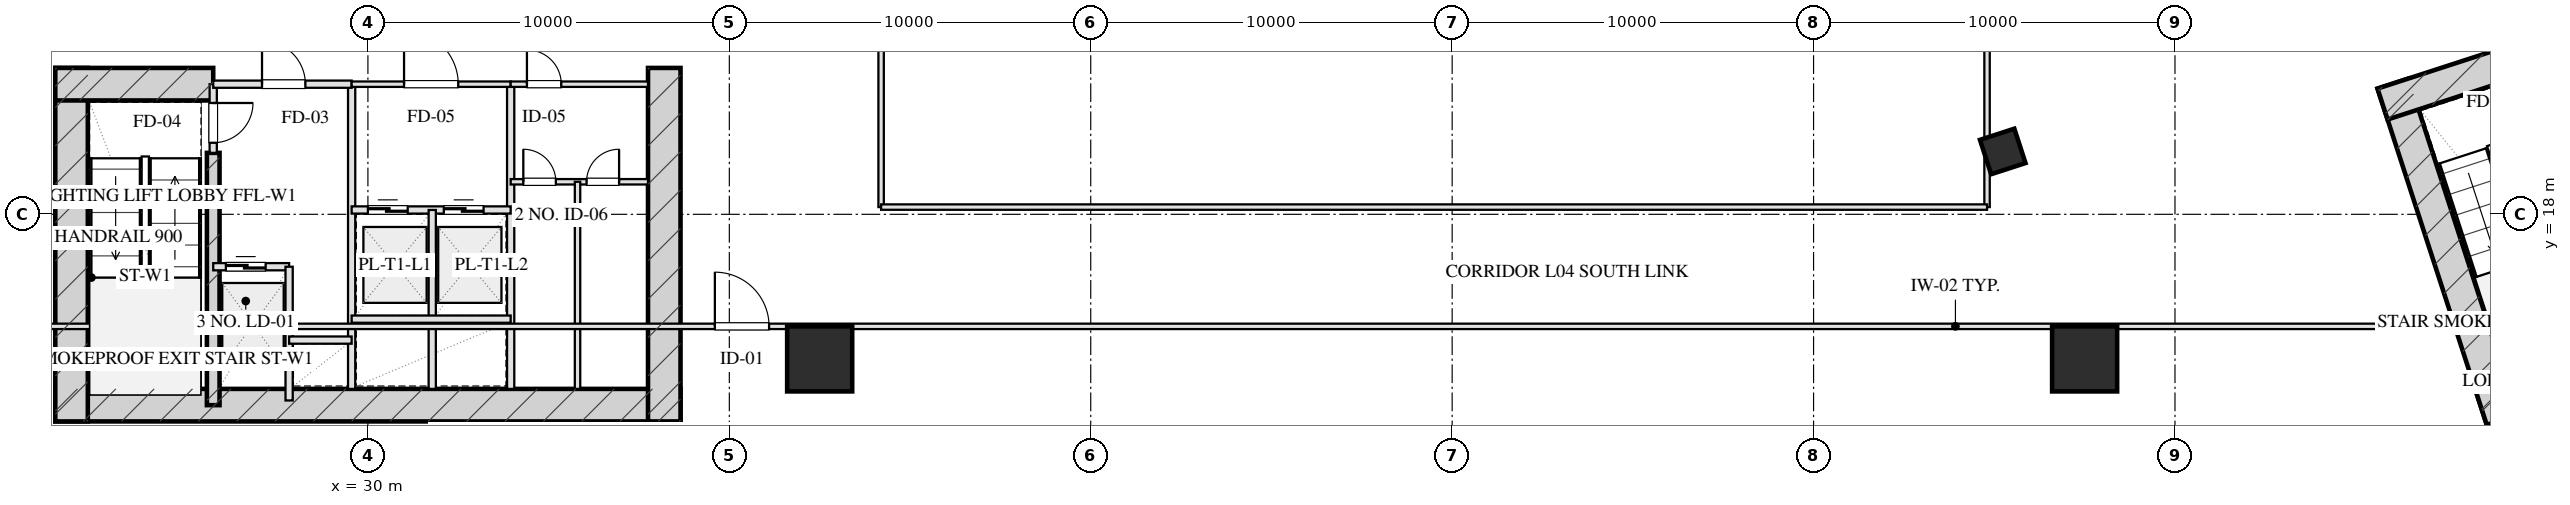
"""IFC4 building model, lengths in metres.
Left out: names, types, materials, properties, quantities, classifications, styles, units other than length and angle.
Written with IfcOpenShell. Run it as: python <this file> out.ifc"""

import sys

from ifc_helpers import new_model, si_unit, direction, frame, frame_2d, origin, origin_2d, place, context, subcontext, project, spatial, rectangle, hollow_rectangle, extrude, element, fill, save


model = new_model("IFC4")
c1 = context("Model", 3, precision=1e-05, world=origin(), true_north=direction((0.0, 1.0)))
c2 = subcontext(c1, "Body", "Model", "MODEL_VIEW")
j1 = project(units=[si_unit("LENGTHUNIT", "METRE"), si_unit("PLANEANGLEUNIT", "RADIAN")], contexts=[c1])
p1 = place(None, origin())
s1 = spatial("IfcSite", under=j1, at=p1, CompositionType="ELEMENT")
p2 = place(p1, origin())
s2 = spatial("IfcBuilding", under=s1, at=p2, CompositionType="ELEMENT")
p3 = place(p2, frame((0.0, 0.0, 22.0)))
s3 = spatial("IfcBuildingStorey", under=s2, at=p3, CompositionType="ELEMENT", Elevation=22.0)
p4 = place(p3, frame((21.35, 12.72, 0.0), z_axis=(0.0, 0.0, 1.0), x_axis=(1.0, 0.0, 0.0)))
e1 = element("IfcWall", 1, at=p4, inside=s3, PredefinedType="SHEAR", context=c2, shape_type="SweptSolid", body=[
    extrude(rectangle(XDim=17.3, YDim=0.9, at=frame_2d((8.65, 0.0))), origin(), (0.0, 0.0, 1.0), 4.0),
])
for number, where, z_axis, x_axis in (
    (2, (21.8, 22.05, 0.0), (0.0, 0.0, 1.0), (0.0, -1.0, 0.0)),
    (3, (38.2, 22.05, 0.0), (0.0, 0.0, 1.0), (0.0, -1.0, 0.0)),
):
    element("IfcWall", number, at=place(p3, frame(where, z_axis=z_axis, x_axis=x_axis)), inside=s3, PredefinedType="SHEAR", context=c2, shape_type="SweptSolid", body=[
        extrude(rectangle(XDim=9.78, YDim=0.9, at=frame_2d((4.89, 0.0))), origin(), (0.0, 0.0, 1.0), 4.0),
    ])
p5 = place(p3, frame((25.72, 19.7, 0.0), z_axis=(0.0, 0.0, 1.0), x_axis=(0.0, -1.0, 0.0)))
e4 = element("IfcWall", 4, at=p5, inside=s3, PredefinedType="SHEAR", context=c2, shape_type="SweptSolid", body=[
    extrude(rectangle(XDim=6.98, YDim=0.35, at=frame_2d((3.49, 0.0))), origin(), (0.0, 0.0, 1.0), 4.0),
])
p6 = place(p3, frame((21.35, 21.6, 0.0), z_axis=(0.0, 0.0, 1.0), x_axis=(1.0, 0.0, 0.0)))
e5 = element("IfcWall", 5, at=p6, inside=s3, PredefinedType="SHEAR", context=c2, shape_type="SweptSolid", body=[
    extrude(rectangle(XDim=4.37, YDim=0.9, at=frame_2d((2.185, 0.0))), origin(), (0.0, 0.0, 1.0), 4.0),
])
p7 = place(p3, frame((88.487, 12.605, 0.0), z_axis=(0.0, 0.0, 1.0), x_axis=(0.951055016115, 0.309021611416, 0.0)))
e6 = element("IfcWall", 6, at=p7, inside=s3, PredefinedType="SHEAR", context=c2, shape_type="SweptSolid", body=[
    extrude(rectangle(XDim=16.7, YDim=0.9, at=frame_2d((8.35, 0.0))), origin(), (0.0, 0.0, 1.0), 4.0),
])
p8 = place(p3, frame((86.032, 21.618, 0.0), z_axis=(0.0, 0.0, 1.0), x_axis=(0.30901438634, -0.951057363693, 0.0)))
e7 = element("IfcWall", 7, at=p8, inside=s3, PredefinedType="SHEAR", context=c2, shape_type="SweptSolid", body=[
    extrude(rectangle(XDim=9.78, YDim=0.9, at=frame_2d((4.89, 0.0))), origin(), (0.0, 0.0, 1.0), 4.0),
])
p9 = place(p3, frame((85.743, 21.051, 0.0), z_axis=(0.0, 0.0, 1.0), x_axis=(0.951063623806, 0.308995118848, 0.0)))
e8 = element("IfcWall", 8, at=p9, inside=s3, PredefinedType="SHEAR", context=c2, shape_type="SweptSolid", body=[
    extrude(rectangle(XDim=4.37, YDim=0.9, at=frame_2d((2.185, 0.0))), origin(), (0.0, 0.0, 1.0), 4.0),
])
for number, where, z_axis, x_axis in (
    (9, (42.5, 14.0, 0.0), (0.0, 0.0, 1.0), (1.0, 0.0, 0.0)),
    (10, (77.5, 14.0, 0.0), (0.0, 0.0, 1.0), (1.0, 0.0, 0.0)),
):
    element("IfcColumn", number, at=place(p3, frame(where, z_axis=z_axis, x_axis=x_axis)), inside=s3, PredefinedType="COLUMN", context=c2, shape_type="SweptSolid", body=[
        extrude(hollow_rectangle(XDim=1.8, YDim=1.8, WallThickness=0.06, at=origin_2d()), origin(), (0.0, 0.0, 1.0), 4.001),
    ])
p10 = place(p3, frame((75.234, 19.739, 0.0), z_axis=(0.0, 0.0, 1.0), x_axis=(0.951056516295, 0.309016994375, 0.0)))
e11 = element("IfcColumn", 11, at=p10, inside=s3, PredefinedType="COLUMN", context=c2, shape_type="SweptSolid", body=[
    extrude(hollow_rectangle(XDim=1.0, YDim=1.0, WallThickness=0.036, at=origin_2d()), origin(), (0.0, 0.0, 1.0), 4.001),
])
p11 = place(p3, frame((25.72, 21.6, 0.0), z_axis=(0.0, 0.0, 1.0), x_axis=(0.0, -1.0, 0.0)))
e12 = element("IfcWall", 12, at=p11, inside=s3, PredefinedType="PARTITIONING", context=c2, shape_type="SweptSolid", body=[
    extrude(rectangle(XDim=1.9, YDim=0.2, at=frame_2d((0.95, 0.0))), origin(), (0.0, 0.0, 1.0), 3.725),
])
p12 = place(p11, frame((0.52, 0.0, 0.0)))
e13 = element("IfcOpeningElement", 13, at=p12, cuts=e12, PredefinedType="OPENING", context=c2, shape_type="SweptSolid", body=[
    extrude(rectangle(XDim=1.1, YDim=2.05, at=frame_2d((0.55, 1.025))), frame((0.0, 0.11, 0.0), z_axis=(0.0, -1.0, 0.0), x_axis=(1.0, 0.0, 0.0)), (0.0, 0.0, 1.0), 0.22),
])
p13 = place(p3, frame((29.55, 21.6, 0.0), z_axis=(0.0, 0.0, 1.0), x_axis=(0.0, -1.0, 0.0)))
e14 = element("IfcWall", 14, at=p13, inside=s3, PredefinedType="PARTITIONING", context=c2, shape_type="SweptSolid", body=[
    extrude(rectangle(XDim=8.43, YDim=0.2, at=frame_2d((4.215, 0.0))), origin(), (0.0, 0.0, 1.0), 3.725),
])
p14 = place(p3, frame((25.72, 21.6, 0.0), z_axis=(0.0, 0.0, 1.0), x_axis=(1.0, 0.0, 0.0)))
e15 = element("IfcWall", 15, at=p14, inside=s3, PredefinedType="PARTITIONING", context=c2, shape_type="SweptSolid", body=[
    extrude(rectangle(XDim=3.83, YDim=0.2, at=frame_2d((1.915, 0.0))), origin(), (0.0, 0.0, 1.0), 3.725),
])
p15 = place(p14, frame((1.35, 0.0, 0.0)))
e16 = element("IfcOpeningElement", 16, at=p15, cuts=e15, PredefinedType="OPENING", context=c2, shape_type="SweptSolid", body=[
    extrude(rectangle(XDim=1.2, YDim=2.05, at=frame_2d((0.6, 1.025))), frame((0.0, 0.11, 0.0), z_axis=(0.0, -1.0, 0.0), x_axis=(1.0, 0.0, 0.0)), (0.0, 0.0, 1.0), 0.22),
])
p16 = place(p3, frame((25.72, 16.55, 0.0), z_axis=(0.0, 0.0, 1.0), x_axis=(1.0, 0.0, 0.0)))
e17 = element("IfcWall", 17, at=p16, inside=s3, PredefinedType="PARTITIONING", context=c2, shape_type="SweptSolid", body=[
    extrude(rectangle(XDim=2.1, YDim=0.2, at=frame_2d((1.05, 0.0))), origin(), (0.0, 0.0, 1.0), 3.725),
])
p17 = place(p16, frame((0.35, 0.0, 0.0)))
e18 = element("IfcOpeningElement", 18, at=p17, cuts=e17, PredefinedType="OPENING", context=c2, shape_type="SweptSolid", body=[
    extrude(rectangle(XDim=1.1, YDim=2.05, at=frame_2d((0.55, 1.025))), frame((0.0, 0.11, 0.0), z_axis=(0.0, -1.0, 0.0), x_axis=(1.0, 0.0, 0.0)), (0.0, 0.0, 1.0), 0.22),
])
p18 = place(p3, frame((27.82, 16.55, 0.0), z_axis=(0.0, 0.0, 1.0), x_axis=(0.0, -1.0, 0.0)))
e19 = element("IfcWall", 19, at=p18, inside=s3, PredefinedType="PARTITIONING", context=c2, shape_type="SweptSolid", body=[
    extrude(rectangle(XDim=3.7, YDim=0.2, at=frame_2d((1.85, 0.0))), origin(), (0.0, 0.0, 1.0), 3.725),
])
p19 = place(p3, frame((27.82, 14.52, 0.0), z_axis=(0.0, 0.0, 1.0), x_axis=(1.0, 0.0, 0.0)))
e20 = element("IfcWall", 20, at=p19, inside=s3, PredefinedType="PARTITIONING", context=c2, shape_type="SweptSolid", body=[
    extrude(rectangle(XDim=1.73, YDim=0.2, at=frame_2d((0.865, 0.0))), origin(), (0.0, 0.0, 1.0), 3.725),
])
p20 = place(p3, frame((33.95, 21.6, 0.0), z_axis=(0.0, 0.0, 1.0), x_axis=(0.0, -1.0, 0.0)))
e21 = element("IfcWall", 21, at=p20, inside=s3, PredefinedType="PARTITIONING", context=c2, shape_type="SweptSolid", body=[
    extrude(rectangle(XDim=8.43, YDim=0.2, at=frame_2d((4.215, 0.0))), origin(), (0.0, 0.0, 1.0), 3.725),
])
p21 = place(p3, frame((29.55, 21.6, 0.0), z_axis=(0.0, 0.0, 1.0), x_axis=(1.0, 0.0, 0.0)))
e22 = element("IfcWall", 22, at=p21, inside=s3, PredefinedType="PARTITIONING", context=c2, shape_type="SweptSolid", body=[
    extrude(rectangle(XDim=4.4, YDim=0.15, at=frame_2d((2.2, 0.0))), origin(), (0.0, 0.0, 1.0), 3.725),
])
p22 = place(p21, frame((1.45, 0.0, 0.0)))
e23 = element("IfcOpeningElement", 23, at=p22, cuts=e22, PredefinedType="OPENING", context=c2, shape_type="SweptSolid", body=[
    extrude(rectangle(XDim=1.5, YDim=2.05, at=frame_2d((0.75, 1.025))), frame((0.0, 0.085, 0.0), z_axis=(0.0, -1.0, 0.0), x_axis=(1.0, 0.0, 0.0)), (0.0, 0.0, 1.0), 0.17),
])
p23 = place(p3, frame((29.55, 18.12, 0.0), z_axis=(0.0, 0.0, 1.0), x_axis=(1.0, 0.0, 0.0)))
e24 = element("IfcWall", 24, at=p23, inside=s3, PredefinedType="PARTITIONING", context=c2, shape_type="SweptSolid", body=[
    extrude(rectangle(XDim=4.4, YDim=0.2, at=frame_2d((2.2, 0.0))), origin(), (0.0, 0.0, 1.0), 3.725),
])
p24 = place(p23, frame((0.45, 0.0, 0.0)))
e25 = element("IfcOpeningElement", 25, at=p24, cuts=e24, PredefinedType="OPENING", context=c2, shape_type="SweptSolid", body=[
    extrude(rectangle(XDim=1.1, YDim=2.05, at=frame_2d((0.55, 1.025))), frame((0.0, 0.11, 0.0), z_axis=(0.0, -1.0, 0.0), x_axis=(1.0, 0.0, 0.0)), (0.0, 0.0, 1.0), 0.22),
])
p25 = place(p23, frame((2.55, 0.0, 0.0)))
e26 = element("IfcOpeningElement", 26, at=p25, cuts=e24, PredefinedType="OPENING", context=c2, shape_type="SweptSolid", body=[
    extrude(rectangle(XDim=1.1, YDim=2.05, at=frame_2d((0.55, 1.025))), frame((0.0, 0.11, 0.0), z_axis=(0.0, -1.0, 0.0), x_axis=(1.0, 0.0, 0.0)), (0.0, 0.0, 1.0), 0.22),
])
p26 = place(p3, frame((31.78, 18.12, 0.0), z_axis=(0.0, 0.0, 1.0), x_axis=(0.0, -1.0, 0.0)))
e27 = element("IfcWall", 27, at=p26, inside=s3, PredefinedType="PARTITIONING", context=c2, shape_type="SweptSolid", body=[
    extrude(rectangle(XDim=4.95, YDim=0.2, at=frame_2d((2.475, 0.0))), origin(), (0.0, 0.0, 1.0), 3.725),
])
p27 = place(p3, frame((29.55, 15.1, 0.0), z_axis=(0.0, 0.0, 1.0), x_axis=(1.0, 0.0, 0.0)))
e28 = element("IfcWall", 28, at=p27, inside=s3, PredefinedType="PARTITIONING", context=c2, shape_type="SweptSolid", body=[
    extrude(rectangle(XDim=4.4, YDim=0.2, at=frame_2d((2.2, 0.0))), origin(), (0.0, 0.0, 1.0), 3.725),
])
p28 = place(p3, frame((33.95, 21.6, 0.0), z_axis=(0.0, 0.0, 1.0), x_axis=(1.0, 0.0, 0.0)))
e29 = element("IfcWall", 29, at=p28, inside=s3, PredefinedType="PARTITIONING", context=c2, shape_type="SweptSolid", body=[
    extrude(rectangle(XDim=3.8, YDim=0.15, at=frame_2d((1.9, 0.0))), origin(), (0.0, 0.0, 1.0), 3.725),
])
p29 = place(p28, frame((0.45, 0.0, 0.0)))
e30 = element("IfcOpeningElement", 30, at=p29, cuts=e29, PredefinedType="OPENING", context=c2, shape_type="SweptSolid", body=[
    extrude(rectangle(XDim=0.95, YDim=2.05, at=frame_2d((0.475, 1.025))), frame((0.0, 0.085, 0.0), z_axis=(0.0, -1.0, 0.0), x_axis=(1.0, 0.0, 0.0)), (0.0, 0.0, 1.0), 0.17),
])
p30 = place(p3, frame((33.95, 18.9, 0.0), z_axis=(0.0, 0.0, 1.0), x_axis=(1.0, 0.0, 0.0)))
e31 = element("IfcWall", 31, at=p30, inside=s3, PredefinedType="PARTITIONING", context=c2, shape_type="SweptSolid", body=[
    extrude(rectangle(XDim=3.8, YDim=0.15, at=frame_2d((1.9, 0.0))), origin(), (0.0, 0.0, 1.0), 3.725),
])
p31 = place(p30, frame((0.35, 0.0, 0.0)))
e32 = element("IfcOpeningElement", 32, at=p31, cuts=e31, PredefinedType="OPENING", context=c2, shape_type="SweptSolid", body=[
    extrude(rectangle(XDim=0.9, YDim=2.05, at=frame_2d((0.45, 1.025))), frame((0.0, 0.085, 0.0), z_axis=(0.0, -1.0, 0.0), x_axis=(1.0, 0.0, 0.0)), (0.0, 0.0, 1.0), 0.17),
])
p32 = place(p30, frame((2.1, 0.0, 0.0)))
e33 = element("IfcOpeningElement", 33, at=p32, cuts=e31, PredefinedType="OPENING", context=c2, shape_type="SweptSolid", body=[
    extrude(rectangle(XDim=0.9, YDim=2.05, at=frame_2d((0.45, 1.025))), frame((0.0, 0.085, 0.0), z_axis=(0.0, -1.0, 0.0), x_axis=(1.0, 0.0, 0.0)), (0.0, 0.0, 1.0), 0.17),
])
p33 = place(p3, frame((35.8, 18.9, 0.0), z_axis=(0.0, 0.0, 1.0), x_axis=(0.0, -1.0, 0.0)))
e34 = element("IfcWall", 34, at=p33, inside=s3, PredefinedType="PARTITIONING", context=c2, shape_type="SweptSolid", body=[
    extrude(rectangle(XDim=5.73, YDim=0.15, at=frame_2d((2.865, 0.0))), origin(), (0.0, 0.0, 1.0), 3.725),
])
p34 = place(p3, frame((44.2, 18.2, 0.0), z_axis=(0.0, 0.0, 1.0), x_axis=(0.0, 1.0, 0.0)))
e35 = element("IfcWall", 35, at=p34, inside=s3, PredefinedType="PARTITIONING", context=c2, shape_type="SweptSolid", body=[
    extrude(rectangle(XDim=31.6, YDim=0.15, at=frame_2d((15.8, 0.0))), origin(), (0.0, 0.0, 1.0), 3.725),
])
p35 = place(p34, frame((14.0, 0.0, 0.0)))
e36 = element("IfcOpeningElement", 36, at=p35, cuts=e35, PredefinedType="OPENING", context=c2, shape_type="SweptSolid", body=[
    extrude(rectangle(XDim=1.5, YDim=2.05, at=frame_2d((0.75, 1.025))), frame((0.0, 0.085, 0.0), z_axis=(0.0, -1.0, 0.0), x_axis=(1.0, 0.0, 0.0)), (0.0, 0.0, 1.0), 0.17),
])
p36 = place(p3, frame((74.8, 18.2, 0.0), z_axis=(0.0, 0.0, 1.0), x_axis=(0.0, 1.0, 0.0)))
e37 = element("IfcWall", 37, at=p36, inside=s3, PredefinedType="PARTITIONING", context=c2, shape_type="SweptSolid", body=[
    extrude(rectangle(XDim=31.6, YDim=0.15, at=frame_2d((15.8, 0.0))), origin(), (0.0, 0.0, 1.0), 2.315),
])
p37 = place(p36, frame((14.0, 0.0, 0.0)))
e38 = element("IfcOpeningElement", 38, at=p37, cuts=e37, PredefinedType="OPENING", context=c2, shape_type="SweptSolid", body=[
    extrude(rectangle(XDim=1.5, YDim=2.05, at=frame_2d((0.75, 1.025))), frame((0.0, 0.085, 0.0), z_axis=(0.0, -1.0, 0.0), x_axis=(1.0, 0.0, 0.0)), (0.0, 0.0, 1.0), 0.17),
])
p38 = place(p3, frame((44.2, 18.2, 0.0), z_axis=(0.0, 0.0, 1.0), x_axis=(1.0, 0.0, 0.0)))
e39 = element("IfcWall", 39, at=p38, inside=s3, PredefinedType="PARTITIONING", context=c2, shape_type="SweptSolid", body=[
    extrude(rectangle(XDim=30.6, YDim=0.15, at=frame_2d((15.3, 0.0))), origin(), (0.0, 0.0, 1.0), 3.265),
])
p39 = place(p3, frame((18.0, 14.9, 0.0), z_axis=(0.0, 0.0, 1.0), x_axis=(1.0, 0.0, 0.0)))
e40 = element("IfcWall", 40, at=p39, inside=s3, PredefinedType="PARTITIONING", context=c2, shape_type="SweptSolid", body=[
    extrude(rectangle(XDim=88.0, YDim=0.15, at=frame_2d((44.0, 0.0))), origin(), (0.0, 0.0, 1.0), 2.615),
])
p40 = place(p39, frame((21.6, 0.0, 0.0)))
e41 = element("IfcOpeningElement", 41, at=p40, cuts=e40, PredefinedType="OPENING", context=c2, shape_type="SweptSolid", body=[
    extrude(rectangle(XDim=1.5, YDim=2.05, at=frame_2d((0.75, 1.025))), frame((0.0, 0.085, 0.0), z_axis=(0.0, -1.0, 0.0), x_axis=(1.0, 0.0, 0.0)), (0.0, 0.0, 1.0), 0.17),
])
p41 = place(p12, origin())
e42 = element("IfcDoor", 42, at=p41, inside=s3, OperationType="SINGLE_SWING_LEFT", PredefinedType="DOOR", context=c2, shape_type="SweptSolid", body=[
    extrude(rectangle(XDim=1.1, YDim=2.05, at=frame_2d((0.55, 1.025))), frame((0.0, 0.025, 0.0), z_axis=(0.0, -1.0, 0.0), x_axis=(1.0, 0.0, 0.0)), (0.0, 0.0, 1.0), 0.05),
])
fill(e13, e42)
p42 = place(p15, origin())
e43 = element("IfcDoor", 43, at=p42, inside=s3, OperationType="SINGLE_SWING_LEFT", PredefinedType="DOOR", context=c2, shape_type="SweptSolid", body=[
    extrude(rectangle(XDim=1.2, YDim=2.05, at=frame_2d((0.6, 1.025))), frame((0.0, 0.025, 0.0), z_axis=(0.0, -1.0, 0.0), x_axis=(1.0, 0.0, 0.0)), (0.0, 0.0, 1.0), 0.05),
])
fill(e16, e43)
p43 = place(p17, origin())
e44 = element("IfcDoor", 44, at=p43, inside=s3, OperationType="DOUBLE_DOOR_SLIDING", PredefinedType="DOOR", context=c2, shape_type="SweptSolid", body=[
    extrude(rectangle(XDim=1.1, YDim=2.05, at=frame_2d((0.55, 1.025))), frame((0.0, 0.025, 0.0), z_axis=(0.0, -1.0, 0.0), x_axis=(1.0, 0.0, 0.0)), (0.0, 0.0, 1.0), 0.05),
])
fill(e18, e44)
p44 = place(p22, origin())
e45 = element("IfcDoor", 45, at=p44, inside=s3, OperationType="SINGLE_SWING_LEFT", PredefinedType="DOOR", context=c2, shape_type="SweptSolid", body=[
    extrude(rectangle(XDim=1.5, YDim=2.05, at=frame_2d((0.75, 1.025))), frame((0.0, 0.025, 0.0), z_axis=(0.0, -1.0, 0.0), x_axis=(1.0, 0.0, 0.0)), (0.0, 0.0, 1.0), 0.05),
])
fill(e23, e45)
p45 = place(p24, origin())
e46 = element("IfcDoor", 46, at=p45, inside=s3, OperationType="DOUBLE_DOOR_SLIDING", PredefinedType="DOOR", context=c2, shape_type="SweptSolid", body=[
    extrude(rectangle(XDim=1.1, YDim=2.05, at=frame_2d((0.55, 1.025))), frame((0.0, 0.025, 0.0), z_axis=(0.0, -1.0, 0.0), x_axis=(1.0, 0.0, 0.0)), (0.0, 0.0, 1.0), 0.05),
])
fill(e25, e46)
p46 = place(p25, origin())
e47 = element("IfcDoor", 47, at=p46, inside=s3, OperationType="DOUBLE_DOOR_SLIDING", PredefinedType="DOOR", context=c2, shape_type="SweptSolid", body=[
    extrude(rectangle(XDim=1.1, YDim=2.05, at=frame_2d((0.55, 1.025))), frame((0.0, 0.025, 0.0), z_axis=(0.0, -1.0, 0.0), x_axis=(1.0, 0.0, 0.0)), (0.0, 0.0, 1.0), 0.05),
])
fill(e26, e47)
p47 = place(p29, origin())
e48 = element("IfcDoor", 48, at=p47, inside=s3, OperationType="SINGLE_SWING_LEFT", PredefinedType="DOOR", context=c2, shape_type="SweptSolid", body=[
    extrude(rectangle(XDim=0.95, YDim=2.05, at=frame_2d((0.475, 1.025))), frame((0.0, 0.025, 0.0), z_axis=(0.0, -1.0, 0.0), x_axis=(1.0, 0.0, 0.0)), (0.0, 0.0, 1.0), 0.05),
])
fill(e30, e48)
p48 = place(p31, origin())
e49 = element("IfcDoor", 49, at=p48, inside=s3, OperationType="SINGLE_SWING_LEFT", PredefinedType="DOOR", context=c2, shape_type="SweptSolid", body=[
    extrude(rectangle(XDim=0.9, YDim=2.05, at=frame_2d((0.45, 1.025))), frame((0.0, 0.025, 0.0), z_axis=(0.0, -1.0, 0.0), x_axis=(1.0, 0.0, 0.0)), (0.0, 0.0, 1.0), 0.05),
])
fill(e32, e49)
p49 = place(p32, origin())
e50 = element("IfcDoor", 50, at=p49, inside=s3, OperationType="SINGLE_SWING_RIGHT", PredefinedType="DOOR", context=c2, shape_type="SweptSolid", body=[
    extrude(rectangle(XDim=0.9, YDim=2.05, at=frame_2d((0.45, 1.025))), frame((0.0, 0.025, 0.0), z_axis=(0.0, -1.0, 0.0), x_axis=(1.0, 0.0, 0.0)), (0.0, 0.0, 1.0), 0.05),
])
fill(e33, e50)
p50 = place(p40, origin())
e51 = element("IfcDoor", 51, at=p50, inside=s3, OperationType="SINGLE_SWING_LEFT", PredefinedType="DOOR", context=c2, shape_type="SweptSolid", body=[
    extrude(rectangle(XDim=1.5, YDim=2.05, at=frame_2d((0.75, 1.025))), frame((0.0, 0.025, 0.0), z_axis=(0.0, -1.0, 0.0), x_axis=(1.0, 0.0, 0.0)), (0.0, 0.0, 1.0), 0.05),
])
fill(e41, e51)
save(model, sys.argv[1])
